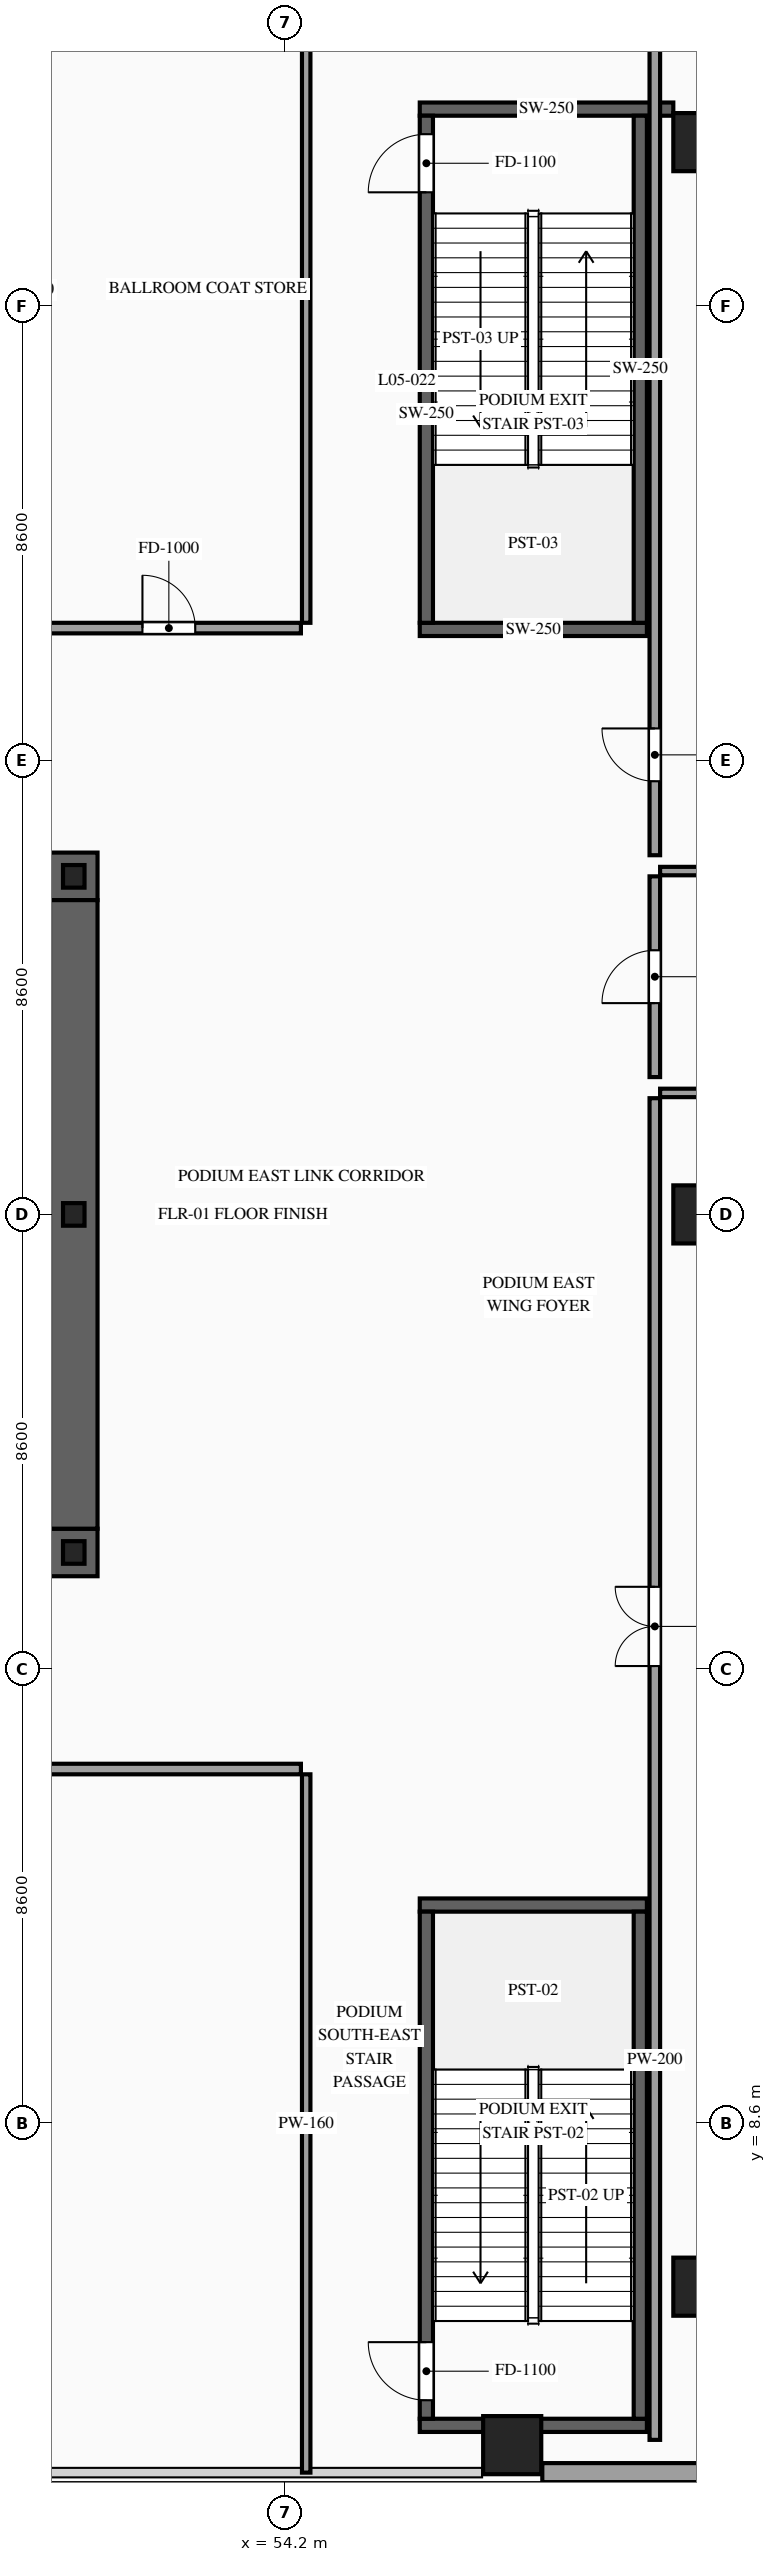
"""IFC4 building model, lengths in metres.
Left out: names, types, materials, properties, quantities, classifications, styles, units other than length and angle.
Written with IfcOpenShell. Run it as: python <this file> out.ifc"""

import sys

from ifc_helpers import new_model, si_unit, direction, frame, frame_2d, origin, origin_2d, place, context, subcontext, project, spatial, rectangle, i_section, extrude, source, transform, mapped, element, fill, save


model = new_model("IFC4")
c1 = context("Model", 3, precision=1e-05, world=origin(), true_north=direction((0.0, 1.0)))
c2 = subcontext(c1, "Body", "Model", "MODEL_VIEW")
j1 = project(units=[si_unit("LENGTHUNIT", "METRE"), si_unit("PLANEANGLEUNIT", "RADIAN")], contexts=[c1])
p1 = place(None, origin())
s1 = spatial("IfcSite", under=j1, at=p1, CompositionType="ELEMENT")
p2 = place(p1, origin())
s2 = spatial("IfcBuilding", under=s1, at=p2, CompositionType="ELEMENT")
p3 = place(p2, frame((0.0, 0.0, 19.8)))
s3 = spatial("IfcBuildingStorey", under=s2, at=p3, CompositionType="ELEMENT", Elevation=19.8)
p4 = place(p3, frame((23.35, 19.4, 0.0), z_axis=(0.0, 0.0, 1.0), x_axis=(1.0, 0.0, 0.0)))
e1 = element("IfcWall", 1, at=p4, inside=s3, PredefinedType="SHEAR", context=c2, shape_type="SweptSolid", body=[
    extrude(rectangle(XDim=27.3, YDim=0.9, at=frame_2d((13.65, 0.0))), origin(), (0.0, 0.0, 1.0), 6.0),
])
p5 = place(p4, frame((2.1, 0.0, 0.0)))
e2 = element("IfcOpeningElement", 2, at=p5, cuts=e1, PredefinedType="OPENING", context=c2, shape_type="SweptSolid", body=[
    extrude(rectangle(XDim=1.1, YDim=2.2, at=frame_2d((0.55, 1.1))), frame((0.0, 0.465, 0.0), z_axis=(0.0, -1.0, 0.0), x_axis=(1.0, 0.0, 0.0)), (0.0, 0.0, 1.0), 0.93),
])
p6 = place(p4, frame((10.0, 0.0, 0.0)))
e3 = element("IfcOpeningElement", 3, at=p6, cuts=e1, PredefinedType="OPENING", context=c2, shape_type="SweptSolid", body=[
    extrude(rectangle(XDim=1.1, YDim=2.2, at=frame_2d((0.55, 1.1))), frame((0.0, 0.465, 0.0), z_axis=(0.0, -1.0, 0.0), x_axis=(1.0, 0.0, 0.0)), (0.0, 0.0, 1.0), 0.93),
])
p7 = place(p4, frame((23.2, 0.0, 0.0)))
e4 = element("IfcOpeningElement", 4, at=p7, cuts=e1, PredefinedType="OPENING", context=c2, shape_type="SweptSolid", body=[
    extrude(rectangle(XDim=1.1, YDim=2.2, at=frame_2d((0.55, 1.1))), frame((0.0, 0.465, 0.0), z_axis=(0.0, -1.0, 0.0), x_axis=(1.0, 0.0, 0.0)), (0.0, 0.0, 1.0), 0.93),
])
p8 = place(p4, frame((19.82, 0.0, 0.0)))
e5 = element("IfcOpeningElement", 5, at=p8, cuts=e1, PredefinedType="OPENING", context=c2, shape_type="SweptSolid", body=[
    extrude(rectangle(XDim=0.9, YDim=2.15, at=frame_2d((0.45, 1.075))), frame((0.0, 0.465, 0.0), z_axis=(0.0, -1.0, 0.0), x_axis=(1.0, 0.0, 0.0)), (0.0, 0.0, 1.0), 0.93),
])
p9 = place(p4, frame((18.38, 0.0, 0.0)))
e6 = element("IfcOpeningElement", 6, at=p9, cuts=e1, PredefinedType="OPENING", context=c2, shape_type="SweptSolid", body=[
    extrude(rectangle(XDim=0.9, YDim=2.15, at=frame_2d((0.45, 1.075))), frame((0.0, 0.465, 0.0), z_axis=(0.0, -1.0, 0.0), x_axis=(1.0, 0.0, 0.0)), (0.0, 0.0, 1.0), 0.93),
])
p10 = place(p3, frame((23.35, 32.2, 0.0), z_axis=(0.0, 0.0, 1.0), x_axis=(1.0, 0.0, 0.0)))
e7 = element("IfcWall", 7, at=p10, inside=s3, PredefinedType="SHEAR", context=c2, shape_type="SweptSolid", body=[
    extrude(rectangle(XDim=27.3, YDim=0.9, at=frame_2d((13.65, 0.0))), origin(), (0.0, 0.0, 1.0), 6.0),
])
p11 = place(p10, frame((4.72, 0.0, 0.0)))
e8 = element("IfcOpeningElement", 8, at=p11, cuts=e7, PredefinedType="OPENING", context=c2, shape_type="SweptSolid", body=[
    extrude(rectangle(XDim=0.9, YDim=2.15, at=frame_2d((0.45, 1.075))), frame((0.0, 0.465, 0.0), z_axis=(0.0, -1.0, 0.0), x_axis=(1.0, 0.0, 0.0)), (0.0, 0.0, 1.0), 0.93),
])
p12 = place(p10, frame((10.0, 0.0, 0.0)))
e9 = element("IfcOpeningElement", 9, at=p12, cuts=e7, PredefinedType="OPENING", context=c2, shape_type="SweptSolid", body=[
    extrude(rectangle(XDim=1.1, YDim=2.2, at=frame_2d((0.55, 1.1))), frame((0.0, 0.465, 0.0), z_axis=(0.0, -1.0, 0.0), x_axis=(1.0, 0.0, 0.0)), (0.0, 0.0, 1.0), 0.93),
])
p13 = place(p10, frame((15.85, 0.0, 0.0)))
e10 = element("IfcOpeningElement", 10, at=p13, cuts=e7, PredefinedType="OPENING", context=c2, shape_type="SweptSolid", body=[
    extrude(rectangle(XDim=1.1, YDim=2.2, at=frame_2d((0.55, 1.1))), frame((0.0, 0.465, 0.0), z_axis=(0.0, -1.0, 0.0), x_axis=(1.0, 0.0, 0.0)), (0.0, 0.0, 1.0), 0.93),
])
p14 = place(p10, frame((19.82, 0.0, 0.0)))
e11 = element("IfcOpeningElement", 11, at=p14, cuts=e7, PredefinedType="OPENING", context=c2, shape_type="SweptSolid", body=[
    extrude(rectangle(XDim=0.9, YDim=2.15, at=frame_2d((0.45, 1.075))), frame((0.0, 0.465, 0.0), z_axis=(0.0, -1.0, 0.0), x_axis=(1.0, 0.0, 0.0)), (0.0, 0.0, 1.0), 0.93),
])
m1 = source(origin(), c2, "Body", "SweptSolid", [
    extrude(rectangle(XDim=11.9, YDim=0.9, at=frame_2d((5.95, 0.0))), origin(), (0.0, 0.0, 1.0), 6.0),
])
p15 = place(p3, frame((50.2, 19.85, 0.0), z_axis=(0.0, 0.0, 1.0), x_axis=(0.0, 1.0, 0.0)))
e12 = element("IfcWall", 12, at=p15, inside=s3, PredefinedType="SHEAR", context=c2, shape_type="MappedRepresentation", body=[
    mapped(m1, transform((0.0, 0.0, 0.0), scale=1.0)),
])
m2 = source(origin(), c2, "Body", "SweptSolid", [
    extrude(i_section(OverallWidth=0.407, OverallDepth=0.428, WebThickness=0.02, FlangeThickness=0.035, at=origin_2d()), origin(), (0.0, 0.0, 1.0), 6.0),
])
for number, where, z_axis, x_axis in (
    (13, (50.2, 19.4, 0.0), (0.0, 0.0, 1.0), (1.0, 0.0, 0.0)),
    (14, (50.2, 25.8, 0.0), (0.0, 0.0, 1.0), (1.0, 0.0, 0.0)),
    (15, (50.2, 32.2, 0.0), (0.0, 0.0, 1.0), (1.0, 0.0, 0.0)),
):
    element("IfcColumn", number, at=place(p3, frame(where, z_axis=z_axis, x_axis=x_axis)), inside=s3, PredefinedType="COLUMN", context=c2, shape_type="MappedRepresentation", body=[
        mapped(m2, transform((0.0, 0.0, 0.0), scale=1.0)),
    ])
m3 = source(origin(), c2, "Body", "SweptSolid", [
    extrude(rectangle(XDim=1.1, YDim=1.1, at=origin_2d()), origin(), (0.0, 0.0, 1.0), 6.0),
])
for number, where, z_axis, x_axis in (
    (16, (62.1, 5.5, 0.0), (0.0, 0.0, 1.0), (1.0, 0.0, 0.0)),
    (17, (62.1, 25.8, 0.0), (0.0, 0.0, 1.0), (1.0, 0.0, 0.0)),
    (18, (62.1, 46.1, 0.0), (0.0, 0.0, 1.0), (1.0, 0.0, 0.0)),
    (19, (58.5, 2.5, 0.0), (0.0, 0.0, 1.0), (1.0, 0.0, 0.0)),
):
    element("IfcColumn", number, at=place(p3, frame(where, z_axis=z_axis, x_axis=x_axis)), inside=s3, PredefinedType="COLUMN", context=c2, shape_type="MappedRepresentation", body=[
        mapped(m3, transform((0.0, 0.0, 0.0), scale=1.0)),
    ])
p16 = place(p3, frame((59.07, 1.98, 0.0), z_axis=(0.0, 0.0, 1.0), x_axis=(1.0, 0.0, 0.0)))
e20 = element("IfcWall", 20, at=p16, inside=s3, PredefinedType="SOLIDWALL", context=c2, shape_type="SweptSolid", body=[
    extrude(rectangle(XDim=12.93, YDim=0.36, at=frame_2d((6.465, 0.0))), origin(), (0.0, 0.0, 1.0), 5.68),
])
p17 = place(p16, frame((5.73, 0.0, 0.85)))
e21 = element("IfcOpeningElement", 21, at=p17, cuts=e20, PredefinedType="OPENING", context=c2, shape_type="SweptSolid", body=[
    extrude(rectangle(XDim=2.4, YDim=2.4, at=frame_2d((1.2, 1.2))), frame((0.0, 0.195, 0.0), z_axis=(0.0, -1.0, 0.0), x_axis=(1.0, 0.0, 0.0)), (0.0, 0.0, 1.0), 0.39),
])
m4 = source(origin(), c2, "Body", "SweptSolid", [
    extrude(rectangle(XDim=4.3, YDim=0.25, at=frame_2d((2.15, 0.0))), origin(), (0.0, 0.0, 1.0), 5.68),
])
for number, where, z_axis, x_axis in (
    (22, (56.75, 2.875, 0.0), (0.0, 0.0, 1.0), (1.0, 0.0, 0.0)),
    (23, (56.75, 12.725, 0.0), (0.0, 0.0, 1.0), (1.0, 0.0, 0.0)),
):
    element("IfcWall", number, at=place(p3, frame(where, z_axis=z_axis, x_axis=x_axis)), inside=s3, PredefinedType="SOLIDWALL", context=c2, shape_type="MappedRepresentation", body=[
        mapped(m4, transform((0.0, 0.0, 0.0), scale=1.0)),
    ])
p18 = place(p3, frame((56.875, 3.0, 0.0), z_axis=(0.0, 0.0, 1.0), x_axis=(0.0, 1.0, 0.0)))
e24 = element("IfcWall", 24, at=p18, inside=s3, PredefinedType="SOLIDWALL", context=c2, shape_type="SweptSolid", body=[
    extrude(rectangle(XDim=9.6, YDim=0.25, at=frame_2d((4.8, 0.0))), origin(), (0.0, 0.0, 1.0), 5.68),
])
p19 = place(p18, frame((0.35, 0.0, 0.0)))
e25 = element("IfcOpeningElement", 25, at=p19, cuts=e24, PredefinedType="OPENING", context=c2, shape_type="SweptSolid", body=[
    extrude(rectangle(XDim=1.1, YDim=2.2, at=frame_2d((0.55, 1.1))), frame((0.0, 0.14, 0.0), z_axis=(0.0, -1.0, 0.0), x_axis=(1.0, 0.0, 0.0)), (0.0, 0.0, 1.0), 0.28),
])
m5 = source(origin(), c2, "Body", "SweptSolid", [
    extrude(rectangle(XDim=9.6, YDim=0.25, at=frame_2d((4.8, 0.0))), origin(), (0.0, 0.0, 1.0), 5.68),
])
p20 = place(p3, frame((60.925, 3.0, 0.0), z_axis=(0.0, 0.0, 1.0), x_axis=(0.0, 1.0, 0.0)))
e26 = element("IfcWall", 26, at=p20, inside=s3, PredefinedType="SOLIDWALL", context=c2, shape_type="MappedRepresentation", body=[
    mapped(m5, transform((0.0, 0.0, 0.0), scale=1.0)),
])
p21 = place(p3, frame((56.75, 36.875, 0.0), z_axis=(0.0, 0.0, 1.0), x_axis=(1.0, 0.0, 0.0)))
e27 = element("IfcWall", 27, at=p21, inside=s3, PredefinedType="SOLIDWALL", context=c2, shape_type="MappedRepresentation", body=[
    mapped(m4, transform((0.0, 0.0, 0.0), scale=1.0)),
])
m6 = source(origin(), c2, "Body", "SweptSolid", [
    extrude(rectangle(XDim=4.8, YDim=0.25, at=frame_2d((2.4, 0.0))), origin(), (0.0, 0.0, 1.0), 5.68),
])
p22 = place(p3, frame((56.75, 46.725, 0.0), z_axis=(0.0, 0.0, 1.0), x_axis=(1.0, 0.0, 0.0)))
e28 = element("IfcWall", 28, at=p22, inside=s3, PredefinedType="SOLIDWALL", context=c2, shape_type="MappedRepresentation", body=[
    mapped(m6, transform((0.0, 0.0, 0.0), scale=1.0)),
])
p23 = place(p3, frame((56.875, 37.0, 0.0), z_axis=(0.0, 0.0, 1.0), x_axis=(0.0, 1.0, 0.0)))
e29 = element("IfcWall", 29, at=p23, inside=s3, PredefinedType="SOLIDWALL", context=c2, shape_type="SweptSolid", body=[
    extrude(rectangle(XDim=9.6, YDim=0.25, at=frame_2d((4.8, 0.0))), origin(), (0.0, 0.0, 1.0), 5.68),
])
p24 = place(p23, frame((8.15, 0.0, 0.0)))
e30 = element("IfcOpeningElement", 30, at=p24, cuts=e29, PredefinedType="OPENING", context=c2, shape_type="SweptSolid", body=[
    extrude(rectangle(XDim=1.1, YDim=2.2, at=frame_2d((0.55, 1.1))), frame((0.0, 0.14, 0.0), z_axis=(0.0, -1.0, 0.0), x_axis=(1.0, 0.0, 0.0)), (0.0, 0.0, 1.0), 0.28),
])
p25 = place(p3, frame((60.925, 37.0, 0.0), z_axis=(0.0, 0.0, 1.0), x_axis=(0.0, 1.0, 0.0)))
e31 = element("IfcWall", 31, at=p25, inside=s3, PredefinedType="SOLIDWALL", context=c2, shape_type="MappedRepresentation", body=[
    mapped(m5, transform((0.0, 0.0, 0.0), scale=1.0)),
])
p26 = place(p3, frame((19.5, 15.3, 0.0), z_axis=(0.0, 0.0, 1.0), x_axis=(1.0, 0.0, 0.0)))
e32 = element("IfcWall", 32, at=p26, inside=s3, PredefinedType="PARTITIONING", context=c2, shape_type="SweptSolid", body=[
    extrude(rectangle(XDim=35.0, YDim=0.2, at=frame_2d((17.5, 0.0))), origin(), (0.0, 0.0, 1.0), 5.68),
])
p27 = place(p26, frame((13.25, 0.0, 0.0)))
e33 = element("IfcOpeningElement", 33, at=p27, cuts=e32, PredefinedType="OPENING", context=c2, shape_type="SweptSolid", body=[
    extrude(rectangle(XDim=1.5, YDim=2.3, at=frame_2d((0.75, 1.15))), frame((0.0, 0.115, 0.0), z_axis=(0.0, -1.0, 0.0), x_axis=(1.0, 0.0, 0.0)), (0.0, 0.0, 1.0), 0.23),
])
m7 = source(origin(), c2, "Body", "SweptSolid", [
    extrude(rectangle(XDim=13.22, YDim=0.16, at=frame_2d((6.61, 0.0))), origin(), (0.0, 0.0, 1.0), 5.68),
])
p28 = place(p3, frame((54.6, 1.98, 0.0), z_axis=(0.0, 0.0, 1.0), x_axis=(0.0, 1.0, 0.0)))
e34 = element("IfcWall", 34, at=p28, inside=s3, PredefinedType="PARTITIONING", context=c2, shape_type="MappedRepresentation", body=[
    mapped(m7, transform((0.0, 0.0, 0.0), scale=1.0)),
])
p29 = place(p3, frame((61.2, 28.4, 0.0), z_axis=(0.0, 0.0, 1.0), x_axis=(0.0, 1.0, 0.0)))
e35 = element("IfcWall", 35, at=p29, inside=s3, PredefinedType="PARTITIONING", context=c2, shape_type="SweptSolid", body=[
    extrude(rectangle(XDim=3.8, YDim=0.2, at=frame_2d((1.9, 0.0))), origin(), (0.0, 0.0, 1.0), 5.68),
])
p30 = place(p29, frame((1.4, 0.0, 0.0)))
e36 = element("IfcOpeningElement", 36, at=p30, cuts=e35, PredefinedType="OPENING", context=c2, shape_type="SweptSolid", body=[
    extrude(rectangle(XDim=1.0, YDim=2.2, at=frame_2d((0.5, 1.1))), frame((0.0, 0.115, 0.0), z_axis=(0.0, -1.0, 0.0), x_axis=(1.0, 0.0, 0.0)), (0.0, 0.0, 1.0), 0.23),
])
m8 = source(origin(), c2, "Body", "SweptSolid", [
    extrude(rectangle(XDim=10.52, YDim=0.16, at=frame_2d((5.26, 0.0))), origin(), (0.0, 0.0, 1.0), 5.68),
])
p31 = place(p3, frame((61.3, 32.3, 0.0), z_axis=(0.0, 0.0, 1.0), x_axis=(1.0, 0.0, 0.0)))
e37 = element("IfcWall", 37, at=p31, inside=s3, PredefinedType="PARTITIONING", context=c2, shape_type="MappedRepresentation", body=[
    mapped(m8, transform((0.0, 0.0, 0.0), scale=1.0)),
])
p32 = place(p3, frame((61.2, 32.6, 0.0), z_axis=(0.0, 0.0, 1.0), x_axis=(0.0, 1.0, 0.0)))
e38 = element("IfcWall", 38, at=p32, inside=s3, PredefinedType="PARTITIONING", context=c2, shape_type="SweptSolid", body=[
    extrude(rectangle(XDim=16.4, YDim=0.2, at=frame_2d((8.2, 0.0))), origin(), (0.0, 0.0, 1.0), 5.68),
])
p33 = place(p32, frame((1.4, 0.0, 0.0)))
e39 = element("IfcOpeningElement", 39, at=p33, cuts=e38, PredefinedType="OPENING", context=c2, shape_type="SweptSolid", body=[
    extrude(rectangle(XDim=1.0, YDim=2.2, at=frame_2d((0.5, 1.1))), frame((0.0, 0.115, 0.0), z_axis=(0.0, -1.0, 0.0), x_axis=(1.0, 0.0, 0.0)), (0.0, 0.0, 1.0), 0.23),
])
p34 = place(p3, frame((61.2, 2.6, 0.0), z_axis=(0.0, 0.0, 1.0), x_axis=(0.0, 1.0, 0.0)))
e40 = element("IfcWall", 40, at=p34, inside=s3, PredefinedType="PARTITIONING", context=c2, shape_type="SweptSolid", body=[
    extrude(rectangle(XDim=25.4, YDim=0.2, at=frame_2d((12.7, 0.0))), origin(), (0.0, 0.0, 1.0), 5.68),
])
p35 = place(p34, frame((14.65, 0.0, 0.0)))
e41 = element("IfcOpeningElement", 41, at=p35, cuts=e40, PredefinedType="OPENING", context=c2, shape_type="SweptSolid", body=[
    extrude(rectangle(XDim=1.5, YDim=2.3, at=frame_2d((0.75, 1.15))), frame((0.0, 0.115, 0.0), z_axis=(0.0, -1.0, 0.0), x_axis=(1.0, 0.0, 0.0)), (0.0, 0.0, 1.0), 0.23),
])
p36 = place(p3, frame((61.3, 28.1, 0.0), z_axis=(0.0, 0.0, 1.0), x_axis=(1.0, 0.0, 0.0)))
e42 = element("IfcWall", 42, at=p36, inside=s3, PredefinedType="PARTITIONING", context=c2, shape_type="MappedRepresentation", body=[
    mapped(m8, transform((0.0, 0.0, 0.0), scale=1.0)),
])
p37 = place(p3, frame((49.6, 36.9, 0.0), z_axis=(0.0, 0.0, 1.0), x_axis=(1.0, 0.0, 0.0)))
e43 = element("IfcWall", 43, at=p37, inside=s3, PredefinedType="PARTITIONING", context=c2, shape_type="SweptSolid", body=[
    extrude(rectangle(XDim=4.9, YDim=0.2, at=frame_2d((2.45, 0.0))), origin(), (0.0, 0.0, 1.0), 5.68),
])
p38 = place(p37, frame((1.9, 0.0, 0.0)))
e44 = element("IfcOpeningElement", 44, at=p38, cuts=e43, PredefinedType="OPENING", context=c2, shape_type="SweptSolid", body=[
    extrude(rectangle(XDim=1.0, YDim=2.2, at=frame_2d((0.5, 1.1))), frame((0.0, 0.115, 0.0), z_axis=(0.0, -1.0, 0.0), x_axis=(1.0, 0.0, 0.0)), (0.0, 0.0, 1.0), 0.23),
])
m9 = source(origin(), c2, "Body", "SweptSolid", [
    extrude(rectangle(XDim=12.62, YDim=0.16, at=frame_2d((6.31, 0.0))), origin(), (0.0, 0.0, 1.0), 5.68),
])
p39 = place(p3, frame((54.6, 37.0, 0.0), z_axis=(0.0, 0.0, 1.0), x_axis=(0.0, 1.0, 0.0)))
e45 = element("IfcWall", 45, at=p39, inside=s3, PredefinedType="PARTITIONING", context=c2, shape_type="MappedRepresentation", body=[
    mapped(m9, transform((0.0, 0.0, 0.0), scale=1.0)),
])
m10 = source(origin(), c2, "Body", "SweptSolid", [
    extrude(rectangle(XDim=1.1, YDim=2.2, at=frame_2d((0.55, 1.1))), frame((0.0, 0.025, 0.0), z_axis=(0.0, -1.0, 0.0), x_axis=(1.0, 0.0, 0.0)), (0.0, 0.0, 1.0), 0.05),
])
p40 = place(p19, origin())
e46 = element("IfcDoor", 46, at=p40, inside=s3, OperationType="SINGLE_SWING_RIGHT", PredefinedType="DOOR", context=c2, shape_type="MappedRepresentation", body=[
    mapped(m10, transform((0.0, 0.0, 0.0), scale=1.0)),
])
fill(e25, e46)
p41 = place(p24, origin())
e47 = element("IfcDoor", 47, at=p41, inside=s3, OperationType="SINGLE_SWING_LEFT", PredefinedType="DOOR", context=c2, shape_type="MappedRepresentation", body=[
    mapped(m10, transform((0.0, 0.0, 0.0), scale=1.0)),
])
fill(e30, e47)
m11 = source(origin(), c2, "Body", "SweptSolid", [
    extrude(rectangle(XDim=1.0, YDim=2.2, at=frame_2d((0.5, 1.1))), frame((0.0, 0.025, 0.0), z_axis=(0.0, -1.0, 0.0), x_axis=(1.0, 0.0, 0.0)), (0.0, 0.0, 1.0), 0.05),
])
p42 = place(p30, origin())
e48 = element("IfcDoor", 48, at=p42, inside=s3, OperationType="SINGLE_SWING_LEFT", PredefinedType="DOOR", context=c2, shape_type="MappedRepresentation", body=[
    mapped(m11, transform((0.0, 0.0, 0.0), scale=1.0)),
])
fill(e36, e48)
p43 = place(p33, origin())
e49 = element("IfcDoor", 49, at=p43, inside=s3, OperationType="SINGLE_SWING_RIGHT", PredefinedType="DOOR", context=c2, shape_type="MappedRepresentation", body=[
    mapped(m11, transform((0.0, 0.0, 0.0), scale=1.0)),
])
fill(e39, e49)
m12 = source(origin(), c2, "Body", "SweptSolid", [
    extrude(rectangle(XDim=1.5, YDim=2.3, at=frame_2d((0.75, 1.15))), frame((0.0, 0.025, 0.0), z_axis=(0.0, -1.0, 0.0), x_axis=(1.0, 0.0, 0.0)), (0.0, 0.0, 1.0), 0.05),
])
p44 = place(p35, origin())
e50 = element("IfcDoor", 50, at=p44, inside=s3, OperationType="DOUBLE_DOOR_SINGLE_SWING", PredefinedType="DOOR", context=c2, shape_type="MappedRepresentation", body=[
    mapped(m12, transform((0.0, 0.0, 0.0), scale=1.0)),
])
fill(e41, e50)
p45 = place(p38, origin())
e51 = element("IfcDoor", 51, at=p45, inside=s3, OperationType="SINGLE_SWING_LEFT", PredefinedType="DOOR", context=c2, shape_type="MappedRepresentation", body=[
    mapped(m11, transform((0.0, 0.0, 0.0), scale=1.0)),
])
fill(e44, e51)
save(model, sys.argv[1])
